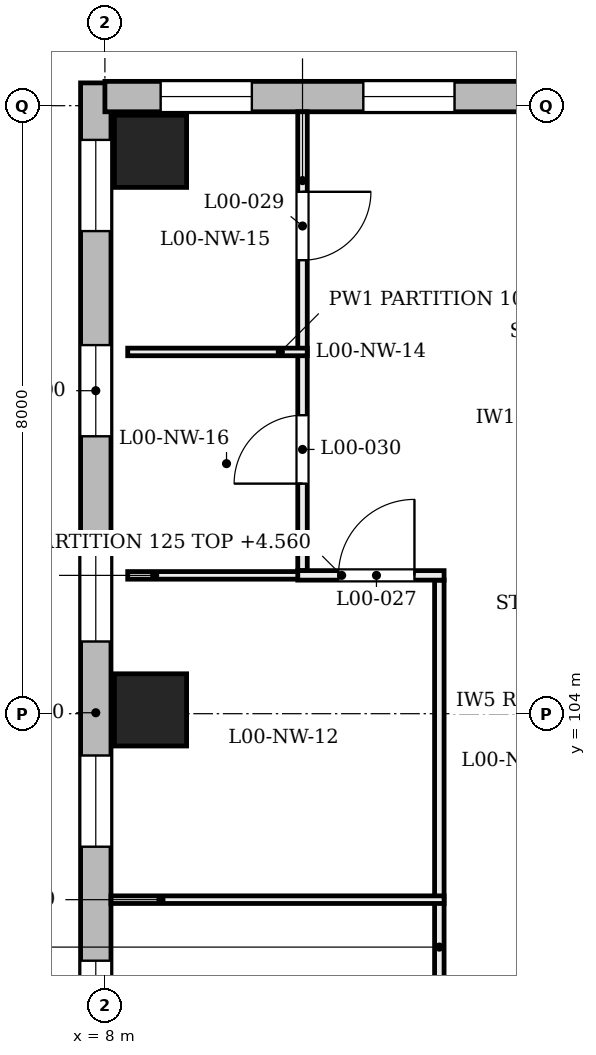
"""IFC4 building model, lengths in metres.
Left out: names, types, materials, properties, quantities, classifications, styles, units other than length and angle.
Written with IfcOpenShell. Run it as: python <this file> out.ifc"""

import sys

from ifc_helpers import new_model, si_unit, direction, frame, frame_2d, origin, origin_2d, place, context, subcontext, project, spatial, rectangle, extrude, element, fill, save


model = new_model("IFC4")
c1 = context("Model", 3, precision=1e-05, world=origin(), true_north=direction((0.0, 1.0)))
c2 = subcontext(c1, "Body", "Model", "MODEL_VIEW")
j1 = project(units=[si_unit("LENGTHUNIT", "METRE"), si_unit("PLANEANGLEUNIT", "RADIAN")], contexts=[c1])
p1 = place(None, origin())
s1 = spatial("IfcSite", under=j1, at=p1, CompositionType="ELEMENT")
p2 = place(p1, origin())
s2 = spatial("IfcBuilding", under=s1, at=p2, CompositionType="ELEMENT")
p3 = place(p2, origin())
s3 = spatial("IfcBuildingStorey", under=s2, at=p3, CompositionType="ELEMENT", Elevation=0.0)
for number, where, z_axis, x_axis in (
    (1, (8.6, 104.05, -1.6), (0.0, 0.0, 1.0), (1.0, 0.0, 0.0)),
    (2, (8.6, 111.4, -1.6), (0.0, 0.0, 1.0), (1.0, 0.0, 0.0)),
):
    element("IfcColumn", number, at=place(p3, frame(where, z_axis=z_axis, x_axis=x_axis)), inside=s3, PredefinedType="COLUMN", context=c2, shape_type="SweptSolid", body=[
        extrude(rectangle(XDim=0.95, YDim=0.95, at=origin_2d()), origin(), (0.0, 0.0, 1.0), 6.4),
    ])
p4 = place(p3, frame((7.88, 95.725, 0.0), z_axis=(0.0, 0.0, 1.0), x_axis=(0.0, 1.0, 0.0)))
e3 = element("IfcWall", 3, at=p4, inside=s3, PredefinedType="SOLIDWALL", context=c2, shape_type="SweptSolid", body=[
    extrude(rectangle(XDim=16.575, YDim=0.4, at=frame_2d((8.288, 0.0))), origin(), (0.0, 0.0, 1.0), 3.9),
])
p5 = place(p4, frame((1.125, 0.0, 1.9)))
e4 = element("IfcOpeningElement", 4, at=p5, cuts=e3, PredefinedType="OPENING", context=c2, shape_type="SweptSolid", body=[
    extrude(rectangle(XDim=1.2, YDim=1.5, at=frame_2d((0.6, 0.75))), frame((0.0, 0.21, 0.0), z_axis=(0.0, -1.0, 0.0), x_axis=(1.0, 0.0, 0.0)), (0.0, 0.0, 1.0), 0.42),
])
p6 = place(p4, frame((3.825, 0.0, 1.9)))
e5 = element("IfcOpeningElement", 5, at=p6, cuts=e3, PredefinedType="OPENING", context=c2, shape_type="SweptSolid", body=[
    extrude(rectangle(XDim=1.2, YDim=1.5, at=frame_2d((0.6, 0.75))), frame((0.0, 0.21, 0.0), z_axis=(0.0, -1.0, 0.0), x_axis=(1.0, 0.0, 0.0)), (0.0, 0.0, 1.0), 0.42),
])
p7 = place(p4, frame((6.525, 0.0, 1.9)))
e6 = element("IfcOpeningElement", 6, at=p7, cuts=e3, PredefinedType="OPENING", context=c2, shape_type="SweptSolid", body=[
    extrude(rectangle(XDim=1.2, YDim=1.5, at=frame_2d((0.6, 0.75))), frame((0.0, 0.21, 0.0), z_axis=(0.0, -1.0, 0.0), x_axis=(1.0, 0.0, 0.0)), (0.0, 0.0, 1.0), 0.42),
])
p8 = place(p4, frame((9.225, 0.0, 1.9)))
e7 = element("IfcOpeningElement", 7, at=p8, cuts=e3, PredefinedType="OPENING", context=c2, shape_type="SweptSolid", body=[
    extrude(rectangle(XDim=1.2, YDim=1.5, at=frame_2d((0.6, 0.75))), frame((0.0, 0.21, 0.0), z_axis=(0.0, -1.0, 0.0), x_axis=(1.0, 0.0, 0.0)), (0.0, 0.0, 1.0), 0.42),
])
p9 = place(p4, frame((11.925, 0.0, 1.9)))
e8 = element("IfcOpeningElement", 8, at=p9, cuts=e3, PredefinedType="OPENING", context=c2, shape_type="SweptSolid", body=[
    extrude(rectangle(XDim=1.2, YDim=1.5, at=frame_2d((0.6, 0.75))), frame((0.0, 0.21, 0.0), z_axis=(0.0, -1.0, 0.0), x_axis=(1.0, 0.0, 0.0)), (0.0, 0.0, 1.0), 0.42),
])
p10 = place(p4, frame((14.625, 0.0, 1.9)))
e9 = element("IfcOpeningElement", 9, at=p10, cuts=e3, PredefinedType="OPENING", context=c2, shape_type="SweptSolid", body=[
    extrude(rectangle(XDim=1.2, YDim=1.5, at=frame_2d((0.6, 0.75))), frame((0.0, 0.21, 0.0), z_axis=(0.0, -1.0, 0.0), x_axis=(1.0, 0.0, 0.0)), (0.0, 0.0, 1.0), 0.42),
])
p11 = place(p3, frame((8.0, 112.12, 0.0), z_axis=(0.0, 0.0, 1.0), x_axis=(1.0, 0.0, 0.0)))
e10 = element("IfcWall", 10, at=p11, inside=s3, PredefinedType="SOLIDWALL", context=c2, shape_type="SweptSolid", body=[
    extrude(rectangle(XDim=8.0, YDim=0.4, at=frame_2d((4.0, 0.0))), origin(), (0.0, 0.0, 1.0), 3.9),
])
p12 = place(p11, frame((0.733, 0.0, 1.9)))
e11 = element("IfcOpeningElement", 11, at=p12, cuts=e10, PredefinedType="OPENING", context=c2, shape_type="SweptSolid", body=[
    extrude(rectangle(XDim=1.2, YDim=1.5, at=frame_2d((0.6, 0.75))), frame((0.0, 0.21, 0.0), z_axis=(0.0, -1.0, 0.0), x_axis=(1.0, 0.0, 0.0)), (0.0, 0.0, 1.0), 0.42),
])
p13 = place(p11, frame((3.4, 0.0, 1.9)))
e12 = element("IfcOpeningElement", 12, at=p13, cuts=e10, PredefinedType="OPENING", context=c2, shape_type="SweptSolid", body=[
    extrude(rectangle(XDim=1.2, YDim=1.5, at=frame_2d((0.6, 0.75))), frame((0.0, 0.21, 0.0), z_axis=(0.0, -1.0, 0.0), x_axis=(1.0, 0.0, 0.0)), (0.0, 0.0, 1.0), 0.42),
])
p14 = place(p11, frame((6.067, 0.0, 1.9)))
e13 = element("IfcOpeningElement", 13, at=p14, cuts=e10, PredefinedType="OPENING", context=c2, shape_type="SweptSolid", body=[
    extrude(rectangle(XDim=1.2, YDim=1.5, at=frame_2d((0.6, 0.75))), frame((0.0, 0.21, 0.0), z_axis=(0.0, -1.0, 0.0), x_axis=(1.0, 0.0, 0.0)), (0.0, 0.0, 1.0), 0.42),
])
p15 = place(p3, frame((12.4, 96.1, 0.0), z_axis=(0.0, 0.0, 1.0), x_axis=(0.0, 1.0, 0.0)))
e14 = element("IfcWall", 14, at=p15, inside=s3, PredefinedType="PARTITIONING", context=c2, shape_type="SweptSolid", body=[
    extrude(rectangle(XDim=9.658, YDim=0.125, at=frame_2d((4.829, 0.0))), origin(), (0.0, 0.0, 1.0), 3.88),
])
p16 = place(p15, frame((2.501, 0.0, 0.0)))
e15 = element("IfcOpeningElement", 15, at=p16, cuts=e14, PredefinedType="OPENING", context=c2, shape_type="SweptSolid", body=[
    extrude(rectangle(XDim=1.0, YDim=2.1, at=frame_2d((0.5, 1.05))), frame((0.0, 0.073, 0.0), z_axis=(0.0, -1.0, 0.0), x_axis=(1.0, 0.0, 0.0)), (0.0, 0.0, 1.0), 0.145),
])
p17 = place(p3, frame((10.6, 105.883, 0.0), z_axis=(0.0, 0.0, 1.0), x_axis=(0.0, 1.0, 0.0)))
e16 = element("IfcWall", 16, at=p17, inside=s3, PredefinedType="PARTITIONING", context=c2, shape_type="SweptSolid", body=[
    extrude(rectangle(XDim=6.037, YDim=0.125, at=frame_2d((3.019, 0.0))), origin(), (0.0, 0.0, 1.0), 3.88),
])
p18 = place(p17, frame((4.084, 0.0, 0.0)))
e17 = element("IfcOpeningElement", 17, at=p18, cuts=e16, PredefinedType="OPENING", context=c2, shape_type="SweptSolid", body=[
    extrude(rectangle(XDim=0.9, YDim=2.1, at=frame_2d((0.45, 1.05))), frame((0.0, 0.073, 0.0), z_axis=(0.0, -1.0, 0.0), x_axis=(1.0, 0.0, 0.0)), (0.0, 0.0, 1.0), 0.145),
])
p19 = place(p17, frame((1.144, 0.0, 0.0)))
e18 = element("IfcOpeningElement", 18, at=p19, cuts=e16, PredefinedType="OPENING", context=c2, shape_type="SweptSolid", body=[
    extrude(rectangle(XDim=0.9, YDim=2.1, at=frame_2d((0.45, 1.05))), frame((0.0, 0.073, 0.0), z_axis=(0.0, -1.0, 0.0), x_axis=(1.0, 0.0, 0.0)), (0.0, 0.0, 1.0), 0.145),
])
p20 = place(p3, frame((8.08, 101.553, 0.0), z_axis=(0.0, 0.0, 1.0), x_axis=(1.0, 0.0, 0.0)))
e19 = element("IfcWall", 19, at=p20, inside=s3, PredefinedType="PARTITIONING", context=c2, shape_type="SweptSolid", body=[
    extrude(rectangle(XDim=4.382, YDim=0.1, at=frame_2d((2.191, 0.0))), origin(), (0.0, 0.0, 1.0), 3.88),
])
p21 = place(p3, frame((8.3, 105.82, 0.0), z_axis=(0.0, 0.0, 1.0), x_axis=(1.0, 0.0, 0.0)))
e20 = element("IfcWall", 20, at=p21, inside=s3, PredefinedType="PARTITIONING", context=c2, shape_type="SweptSolid", body=[
    extrude(rectangle(XDim=2.363, YDim=0.1, at=frame_2d((1.181, 0.0))), origin(), (0.0, 0.0, 1.0), 3.98),
])
p22 = place(p3, frame((10.538, 105.82, 0.0), z_axis=(0.0, 0.0, 1.0), x_axis=(1.0, 0.0, 0.0)))
e21 = element("IfcWall", 21, at=p22, inside=s3, PredefinedType="PARTITIONING", context=c2, shape_type="SweptSolid", body=[
    extrude(rectangle(XDim=1.925, YDim=0.125, at=frame_2d((0.962, 0.0))), origin(), (0.0, 0.0, 1.0), 4.56),
])
p23 = place(p22, frame((0.535, 0.0, 0.0)))
e22 = element("IfcOpeningElement", 22, at=p23, cuts=e21, PredefinedType="OPENING", context=c2, shape_type="SweptSolid", body=[
    extrude(rectangle(XDim=1.0, YDim=2.1, at=frame_2d((0.5, 1.05))), frame((0.0, 0.073, 0.0), z_axis=(0.0, -1.0, 0.0), x_axis=(1.0, 0.0, 0.0)), (0.0, 0.0, 1.0), 0.145),
])
p24 = place(p3, frame((8.3, 108.76, 0.0), z_axis=(0.0, 0.0, 1.0), x_axis=(1.0, 0.0, 0.0)))
e23 = element("IfcWall", 23, at=p24, inside=s3, PredefinedType="PARTITIONING", context=c2, shape_type="SweptSolid", body=[
    extrude(rectangle(XDim=2.363, YDim=0.1, at=frame_2d((1.181, 0.0))), origin(), (0.0, 0.0, 1.0), 3.98),
])
p25 = place(p6, origin())
e24 = element("IfcWindow", 24, at=p25, inside=s3, PartitioningType="SINGLE_PANEL", PredefinedType="WINDOW", context=c2, shape_type="SweptSolid", body=[
    extrude(rectangle(XDim=1.2, YDim=1.5, at=frame_2d((0.6, 0.75))), frame((0.0, 0.03, 0.0), z_axis=(0.0, -1.0, 0.0), x_axis=(1.0, 0.0, 0.0)), (0.0, 0.0, 1.0), 0.06),
])
fill(e5, e24)
p26 = place(p7, origin())
e25 = element("IfcWindow", 25, at=p26, inside=s3, PartitioningType="SINGLE_PANEL", PredefinedType="WINDOW", context=c2, shape_type="SweptSolid", body=[
    extrude(rectangle(XDim=1.2, YDim=1.5, at=frame_2d((0.6, 0.75))), frame((0.0, 0.03, 0.0), z_axis=(0.0, -1.0, 0.0), x_axis=(1.0, 0.0, 0.0)), (0.0, 0.0, 1.0), 0.06),
])
fill(e6, e25)
p27 = place(p8, origin())
e26 = element("IfcWindow", 26, at=p27, inside=s3, PartitioningType="SINGLE_PANEL", PredefinedType="WINDOW", context=c2, shape_type="SweptSolid", body=[
    extrude(rectangle(XDim=1.2, YDim=1.5, at=frame_2d((0.6, 0.75))), frame((0.0, 0.03, 0.0), z_axis=(0.0, -1.0, 0.0), x_axis=(1.0, 0.0, 0.0)), (0.0, 0.0, 1.0), 0.06),
])
fill(e7, e26)
p28 = place(p9, origin())
e27 = element("IfcWindow", 27, at=p28, inside=s3, PartitioningType="SINGLE_PANEL", PredefinedType="WINDOW", context=c2, shape_type="SweptSolid", body=[
    extrude(rectangle(XDim=1.2, YDim=1.5, at=frame_2d((0.6, 0.75))), frame((0.0, 0.03, 0.0), z_axis=(0.0, -1.0, 0.0), x_axis=(1.0, 0.0, 0.0)), (0.0, 0.0, 1.0), 0.06),
])
fill(e8, e27)
p29 = place(p10, origin())
e28 = element("IfcWindow", 28, at=p29, inside=s3, PartitioningType="SINGLE_PANEL", PredefinedType="WINDOW", context=c2, shape_type="SweptSolid", body=[
    extrude(rectangle(XDim=1.2, YDim=1.5, at=frame_2d((0.6, 0.75))), frame((0.0, 0.03, 0.0), z_axis=(0.0, -1.0, 0.0), x_axis=(1.0, 0.0, 0.0)), (0.0, 0.0, 1.0), 0.06),
])
fill(e9, e28)
p30 = place(p12, origin())
e29 = element("IfcWindow", 29, at=p30, inside=s3, PartitioningType="SINGLE_PANEL", PredefinedType="WINDOW", context=c2, shape_type="SweptSolid", body=[
    extrude(rectangle(XDim=1.2, YDim=1.5, at=frame_2d((0.6, 0.75))), frame((0.0, 0.03, 0.0), z_axis=(0.0, -1.0, 0.0), x_axis=(1.0, 0.0, 0.0)), (0.0, 0.0, 1.0), 0.06),
])
fill(e11, e29)
p31 = place(p13, origin())
e30 = element("IfcWindow", 30, at=p31, inside=s3, PartitioningType="SINGLE_PANEL", PredefinedType="WINDOW", context=c2, shape_type="SweptSolid", body=[
    extrude(rectangle(XDim=1.2, YDim=1.5, at=frame_2d((0.6, 0.75))), frame((0.0, 0.03, 0.0), z_axis=(0.0, -1.0, 0.0), x_axis=(1.0, 0.0, 0.0)), (0.0, 0.0, 1.0), 0.06),
])
fill(e12, e30)
p32 = place(p23, frame((1.0, 0.0, 0.0), z_axis=(0.0, 0.0, 1.0), x_axis=(-1.0, 0.0, 0.0)))
e31 = element("IfcDoor", 31, at=p32, inside=s3, OperationType="SINGLE_SWING_RIGHT", PredefinedType="DOOR", context=c2, shape_type="SweptSolid", body=[
    extrude(rectangle(XDim=1.0, YDim=2.1, at=frame_2d((0.5, 1.05))), frame((0.0, 0.025, 0.0), z_axis=(0.0, -1.0, 0.0), x_axis=(1.0, 0.0, 0.0)), (0.0, 0.0, 1.0), 0.05),
])
fill(e22, e31)
p33 = place(p18, origin())
e32 = element("IfcDoor", 32, at=p33, inside=s3, OperationType="SINGLE_SWING_RIGHT", PredefinedType="DOOR", context=c2, shape_type="SweptSolid", body=[
    extrude(rectangle(XDim=0.9, YDim=2.1, at=frame_2d((0.45, 1.05))), frame((0.0, 0.025, 0.0), z_axis=(0.0, -1.0, 0.0), x_axis=(1.0, 0.0, 0.0)), (0.0, 0.0, 1.0), 0.05),
])
fill(e17, e32)
p34 = place(p19, origin())
e33 = element("IfcDoor", 33, at=p34, inside=s3, OperationType="SINGLE_SWING_LEFT", PredefinedType="DOOR", context=c2, shape_type="SweptSolid", body=[
    extrude(rectangle(XDim=0.9, YDim=2.1, at=frame_2d((0.45, 1.05))), frame((0.0, 0.025, 0.0), z_axis=(0.0, -1.0, 0.0), x_axis=(1.0, 0.0, 0.0)), (0.0, 0.0, 1.0), 0.05),
])
fill(e18, e33)
save(model, sys.argv[1])
